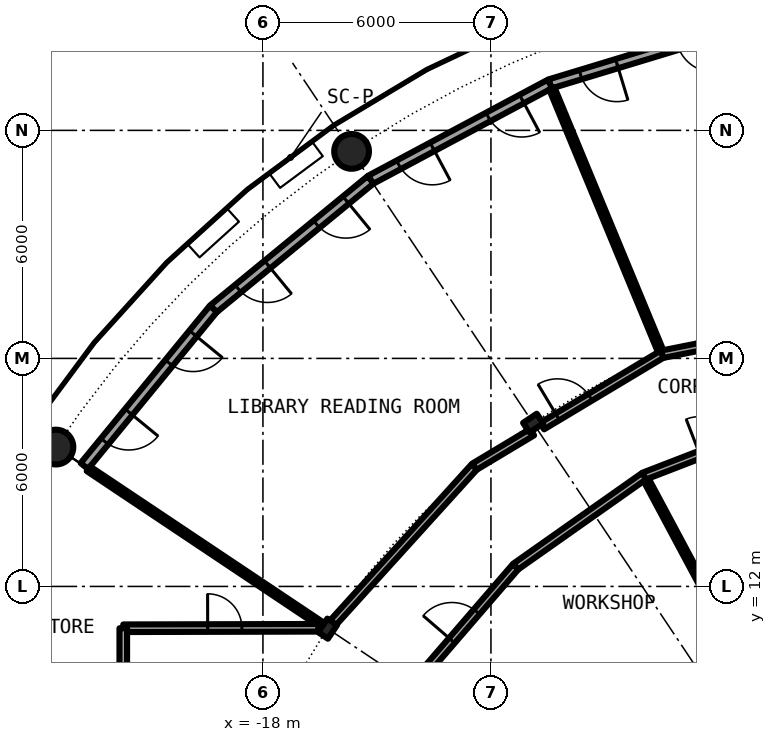
"""IFC4 building model, lengths in metres.
Left out: names, types, materials, properties, quantities, classifications, styles, units other than length and angle.
Written with IfcOpenShell. Run it as: python <this file> out.ifc"""

import sys

from ifc_helpers import new_model, si_unit, direction, frame, frame_2d, origin, origin_2d, place, context, subcontext, project, spatial, rectangle, hollow_circle, i_section, extrude, element, fill, save


model = new_model("IFC4")
c1 = context("Model", 3, precision=1e-05, world=origin(), true_north=direction((0.0, 1.0)))
c2 = subcontext(c1, "Body", "Model", "MODEL_VIEW")
j1 = project(units=[si_unit("LENGTHUNIT", "METRE"), si_unit("PLANEANGLEUNIT", "RADIAN")], contexts=[c1])
p1 = place(None, origin())
s1 = spatial("IfcSite", under=j1, at=p1, CompositionType="ELEMENT")
p2 = place(p1, origin())
s2 = spatial("IfcBuilding", under=s1, at=p2, CompositionType="ELEMENT")
p3 = place(p2, frame((0.0, 0.0, 107.45)))
s3 = spatial("IfcBuildingStorey", under=s2, at=p3, CompositionType="ELEMENT", Elevation=107.45)
for number, where, z_axis, x_axis in (
    (1, (-15.667, 23.448, 0.0), (0.0, 0.0, 1.0), (1.0, 0.0, 0.0)),
    (2, (-23.448, 15.667, 0.0), (0.0, 0.0, 1.0), (1.0, 0.0, 0.0)),
):
    element("IfcColumn", number, at=place(p3, frame(where, z_axis=z_axis, x_axis=x_axis)), inside=s3, PredefinedType="COLUMN", context=c2, shape_type="SweptSolid", body=[
        extrude(hollow_circle(Radius=0.457, WallThickness=0.04, at=origin_2d()), origin(), (0.0, 0.0, 1.0), 4.2),
    ])
for number, where, z_axis, x_axis in (
    (3, (-10.889, 16.297, 0.0), (0.0, 0.0, 1.0), (-0.556, 0.831, 0.0)),
    (4, (-16.297, 10.889, 0.0), (0.0, 0.0, 1.0), (-0.831, 0.556, 0.0)),
):
    element("IfcColumn", number, at=place(p3, frame(where, z_axis=z_axis, x_axis=x_axis)), inside=s3, PredefinedType="COLUMN", context=c2, shape_type="SweptSolid", body=[
        extrude(i_section(OverallWidth=0.307, OverallDepth=0.432, WebThickness=0.021, FlangeThickness=0.04, FilletRadius=0.027, at=origin_2d()), origin(), (0.0, 0.0, 1.0), 4.2),
    ])
p4 = place(p3, frame((-5.326, 26.775, 0.0), z_axis=(0.0, 0.0, 1.0), x_axis=(-0.956965678721, -0.290201119486, 0.0)))
e5 = element("IfcWall", 5, at=p4, inside=s3, PredefinedType="SOLIDWALL", context=c2, shape_type="SweptSolid", body=[
    extrude(rectangle(XDim=5.351, YDim=0.25, at=frame_2d((2.676, 0.0))), origin(), (0.0, 0.0, 1.0), 3.85),
])
p5 = place(p4, frame((0.841, 0.0, 0.0)))
e6 = element("IfcOpeningElement", 6, at=p5, cuts=e5, PredefinedType="OPENING", context=c2, shape_type="SweptSolid", body=[
    extrude(rectangle(XDim=1.0, YDim=2.2, at=frame_2d((0.5, 1.1))), frame((0.0, 0.135, 0.0), z_axis=(0.0, -1.0, 0.0), x_axis=(1.0, 0.0, 0.0)), (0.0, 0.0, 1.0), 0.27),
])
p6 = place(p4, frame((3.51, 0.0, 0.0)))
e7 = element("IfcOpeningElement", 7, at=p6, cuts=e5, PredefinedType="OPENING", context=c2, shape_type="SweptSolid", body=[
    extrude(rectangle(XDim=1.0, YDim=2.2, at=frame_2d((0.5, 1.1))), frame((0.0, 0.135, 0.0), z_axis=(0.0, -1.0, 0.0), x_axis=(1.0, 0.0, 0.0)), (0.0, 0.0, 1.0), 0.27),
])
p7 = place(p3, frame((-10.447, 25.222, 0.0), z_axis=(0.0, 0.0, 1.0), x_axis=(-0.881915646801, -0.471407246368, 0.0)))
e8 = element("IfcWall", 8, at=p7, inside=s3, PredefinedType="SOLIDWALL", context=c2, shape_type="SweptSolid", body=[
    extrude(rectangle(XDim=5.352, YDim=0.25, at=frame_2d((2.676, 0.0))), origin(), (0.0, 0.0, 1.0), 3.85),
])
p8 = place(p7, frame((0.841, 0.0, 0.0)))
e9 = element("IfcOpeningElement", 9, at=p8, cuts=e8, PredefinedType="OPENING", context=c2, shape_type="SweptSolid", body=[
    extrude(rectangle(XDim=1.0, YDim=2.2, at=frame_2d((0.5, 1.1))), frame((0.0, 0.135, 0.0), z_axis=(0.0, -1.0, 0.0), x_axis=(1.0, 0.0, 0.0)), (0.0, 0.0, 1.0), 0.27),
])
p9 = place(p7, frame((3.51, 0.0, 0.0)))
e10 = element("IfcOpeningElement", 10, at=p9, cuts=e8, PredefinedType="OPENING", context=c2, shape_type="SweptSolid", body=[
    extrude(rectangle(XDim=1.0, YDim=2.2, at=frame_2d((0.5, 1.1))), frame((0.0, 0.135, 0.0), z_axis=(0.0, -1.0, 0.0), x_axis=(1.0, 0.0, 0.0)), (0.0, 0.0, 1.0), 0.27),
])
p10 = place(p3, frame((-15.167, 22.699, 0.0), z_axis=(0.0, 0.0, 1.0), x_axis=(-0.773019449054, -0.634382322723, 0.0)))
e11 = element("IfcWall", 11, at=p10, inside=s3, PredefinedType="SOLIDWALL", context=c2, shape_type="SweptSolid", body=[
    extrude(rectangle(XDim=5.352, YDim=0.25, at=frame_2d((2.676, 0.0))), origin(), (0.0, 0.0, 1.0), 3.85),
])
p11 = place(p10, frame((0.841, 0.0, 0.0)))
e12 = element("IfcOpeningElement", 12, at=p11, cuts=e11, PredefinedType="OPENING", context=c2, shape_type="SweptSolid", body=[
    extrude(rectangle(XDim=1.0, YDim=2.2, at=frame_2d((0.5, 1.1))), frame((0.0, 0.135, 0.0), z_axis=(0.0, -1.0, 0.0), x_axis=(1.0, 0.0, 0.0)), (0.0, 0.0, 1.0), 0.27),
])
p12 = place(p10, frame((3.51, 0.0, 0.0)))
e13 = element("IfcOpeningElement", 13, at=p12, cuts=e11, PredefinedType="OPENING", context=c2, shape_type="SweptSolid", body=[
    extrude(rectangle(XDim=1.0, YDim=2.2, at=frame_2d((0.5, 1.1))), frame((0.0, 0.135, 0.0), z_axis=(0.0, -1.0, 0.0), x_axis=(1.0, 0.0, 0.0)), (0.0, 0.0, 1.0), 0.27),
])
p13 = place(p3, frame((-19.304, 19.304, 0.0), z_axis=(0.0, 0.0, 1.0), x_axis=(-0.634382322723, -0.773019449054, 0.0)))
e14 = element("IfcWall", 14, at=p13, inside=s3, PredefinedType="SOLIDWALL", context=c2, shape_type="SweptSolid", body=[
    extrude(rectangle(XDim=5.352, YDim=0.25, at=frame_2d((2.676, 0.0))), origin(), (0.0, 0.0, 1.0), 3.85),
])
p14 = place(p13, frame((0.841, 0.0, 0.0)))
e15 = element("IfcOpeningElement", 15, at=p14, cuts=e14, PredefinedType="OPENING", context=c2, shape_type="SweptSolid", body=[
    extrude(rectangle(XDim=1.0, YDim=2.2, at=frame_2d((0.5, 1.1))), frame((0.0, 0.135, 0.0), z_axis=(0.0, -1.0, 0.0), x_axis=(1.0, 0.0, 0.0)), (0.0, 0.0, 1.0), 0.27),
])
p15 = place(p13, frame((3.51, 0.0, 0.0)))
e16 = element("IfcOpeningElement", 16, at=p15, cuts=e14, PredefinedType="OPENING", context=c2, shape_type="SweptSolid", body=[
    extrude(rectangle(XDim=1.0, YDim=2.2, at=frame_2d((0.5, 1.1))), frame((0.0, 0.135, 0.0), z_axis=(0.0, -1.0, 0.0), x_axis=(1.0, 0.0, 0.0)), (0.0, 0.0, 1.0), 0.27),
])
p16 = place(p3, frame((-22.595, 15.098, 0.0), z_axis=(0.0, 0.0, 1.0), x_axis=(0.831406593008, -0.555664536482, 0.0)))
e17 = element("IfcWall", 17, at=p16, inside=s3, PredefinedType="PARTITIONING", context=c2, shape_type="SweptSolid", body=[
    extrude(rectangle(XDim=7.358, YDim=0.15, at=frame_2d((3.679, 0.0))), origin(), (0.0, 0.0, 1.0), 3.85),
])
p17 = place(p3, frame((-10.399, 25.106, 0.0), z_axis=(0.0, 0.0, 1.0), x_axis=(0.382600411313, -0.923913916587, 0.0)))
e18 = element("IfcWall", 18, at=p17, inside=s3, PredefinedType="PARTITIONING", context=c2, shape_type="SweptSolid", body=[
    extrude(rectangle(XDim=7.574, YDim=0.15, at=frame_2d((3.787, 0.0))), origin(), (0.0, 0.0, 1.0), 3.85),
])
p18 = place(p3, frame((-7.969, 14.903, 0.0), z_axis=(0.0, 0.0, 1.0), x_axis=(0.471428625665, -0.881904218667, 0.0)))
e19 = element("IfcWall", 19, at=p18, inside=s3, PredefinedType="PARTITIONING", context=c2, shape_type="SweptSolid", body=[
    extrude(rectangle(XDim=9.18, YDim=0.15, at=frame_2d((4.59, 0.0))), origin(), (0.0, 0.0, 1.0), 3.85),
])
p19 = place(p3, frame((-21.675, 10.9, 0.0), z_axis=(0.0, 0.0, 1.0), x_axis=(0.999997173357, 0.002377662213, 0.0)))
e20 = element("IfcWall", 20, at=p19, inside=s3, PredefinedType="PARTITIONING", context=c2, shape_type="SweptSolid", body=[
    extrude(rectangle(XDim=5.134, YDim=0.2, at=frame_2d((2.567, 0.0))), origin(), (0.0, 0.0, 1.0), 3.85),
])
p20 = place(p19, frame((2.221, 0.0, 0.0)))
e21 = element("IfcOpeningElement", 21, at=p20, cuts=e20, PredefinedType="OPENING", context=c2, shape_type="SweptSolid", body=[
    extrude(rectangle(XDim=0.9, YDim=2.3, at=frame_2d((0.45, 1.15))), frame((0.0, 0.11, 0.0), z_axis=(0.0, -1.0, 0.0), x_axis=(1.0, 0.0, 0.0)), (0.0, 0.0, 1.0), 0.22),
])
p21 = place(p3, frame((-14.052, 9.389, 0.0), z_axis=(0.0, 0.0, 1.0), x_axis=(0.653212695939, 0.757174467256, 0.0)))
e22 = element("IfcWall", 22, at=p21, inside=s3, PredefinedType="PARTITIONING", context=c2, shape_type="SweptSolid", body=[
    extrude(rectangle(XDim=4.138, YDim=0.2, at=frame_2d((2.069, 0.0))), origin(), (0.0, 0.0, 1.0), 3.85),
])
p22 = place(p21, frame((1.569, 0.0, 0.0)))
e23 = element("IfcOpeningElement", 23, at=p22, cuts=e22, PredefinedType="OPENING", context=c2, shape_type="SweptSolid", body=[
    extrude(rectangle(XDim=1.0, YDim=2.3, at=frame_2d((0.5, 1.15))), frame((0.0, 0.11, 0.0), z_axis=(0.0, -1.0, 0.0), x_axis=(1.0, 0.0, 0.0)), (0.0, 0.0, 1.0), 0.22),
])
p23 = place(p3, frame((-11.349, 12.522, 0.0), z_axis=(0.0, 0.0, 1.0), x_axis=(0.817567680547, 0.575832517079, 0.0)))
e24 = element("IfcWall", 24, at=p23, inside=s3, PredefinedType="PARTITIONING", context=c2, shape_type="SweptSolid", body=[
    extrude(rectangle(XDim=4.137, YDim=0.2, at=frame_2d((2.068, 0.0))), origin(), (0.0, 0.0, 1.0), 3.85),
])
p24 = place(p3, frame((-7.967, 14.904, 0.0), z_axis=(0.0, 0.0, 1.0), x_axis=(0.932943640288, 0.360022449363, 0.0)))
e25 = element("IfcWall", 25, at=p24, inside=s3, PredefinedType="PARTITIONING", context=c2, shape_type="SweptSolid", body=[
    extrude(rectangle(XDim=4.139, YDim=0.2, at=frame_2d((2.069, 0.0))), origin(), (0.0, 0.0, 1.0), 3.85),
])
p25 = place(p24, frame((1.569, 0.0, 0.0)))
e26 = element("IfcOpeningElement", 26, at=p25, cuts=e25, PredefinedType="OPENING", context=c2, shape_type="SweptSolid", body=[
    extrude(rectangle(XDim=1.0, YDim=2.3, at=frame_2d((0.5, 1.15))), frame((0.0, 0.11, 0.0), z_axis=(0.0, -1.0, 0.0), x_axis=(1.0, 0.0, 0.0)), (0.0, 0.0, 1.0), 0.22),
])
p26 = place(p3, frame((-7.501, 18.108, 0.0), z_axis=(0.0, 0.0, 1.0), x_axis=(0.980781515054, 0.195109250749, 0.0)))
e27 = element("IfcWall", 27, at=p26, inside=s3, PredefinedType="PARTITIONING", context=c2, shape_type="SweptSolid", body=[
    extrude(rectangle(XDim=7.648, YDim=0.2, at=frame_2d((3.824, 0.0))), origin(), (0.0, 0.0, 1.0), 3.54),
])
p27 = place(p26, frame((4.35, 0.0, 0.0)))
e28 = element("IfcOpeningElement", 28, at=p27, cuts=e27, PredefinedType="OPENING", context=c2, shape_type="SweptSolid", body=[
    extrude(rectangle(XDim=1.0, YDim=2.3, at=frame_2d((0.5, 1.15))), frame((0.0, 0.11, 0.0), z_axis=(0.0, -1.0, 0.0), x_axis=(1.0, 0.0, 0.0)), (0.0, 0.0, 1.0), 0.22),
])
p28 = place(p3, frame((-16.192, 11.004, 0.0), z_axis=(0.0, 0.0, 1.0), x_axis=(0.671481997275, 0.741020868354, 0.0)))
e29 = element("IfcWall", 29, at=p28, inside=s3, PredefinedType="PARTITIONING", context=c2, shape_type="SweptSolid", body=[
    extrude(rectangle(XDim=5.596, YDim=0.2, at=frame_2d((2.798, 0.0))), origin(), (0.0, 0.0, 1.0), 3.54),
])
p29 = place(p3, frame((-12.434, 15.151, 0.0), z_axis=(0.0, 0.0, 1.0), x_axis=(0.857663265693, 0.514211748875, 0.0)))
e30 = element("IfcWall", 30, at=p29, inside=s3, PredefinedType="PARTITIONING", context=c2, shape_type="SweptSolid", body=[
    extrude(rectangle(XDim=1.77, YDim=0.2, at=frame_2d((0.885, 0.0))), origin(), (0.0, 0.0, 1.0), 3.54),
])
p30 = place(p3, frame((-10.653, 16.219, 0.0), z_axis=(0.0, 0.0, 1.0), x_axis=(0.857774179698, 0.514026708103, 0.0)))
e31 = element("IfcWall", 31, at=p30, inside=s3, PredefinedType="PARTITIONING", context=c2, shape_type="SweptSolid", body=[
    extrude(rectangle(XDim=3.675, YDim=0.2, at=frame_2d((1.837, 0.0))), origin(), (0.0, 0.0, 1.0), 3.54),
])
p31 = place(p30, frame((0.473, 0.0, 0.0)))
e32 = element("IfcOpeningElement", 32, at=p31, cuts=e31, PredefinedType="OPENING", context=c2, shape_type="SweptSolid", body=[
    extrude(rectangle(XDim=1.0, YDim=2.3, at=frame_2d((0.5, 1.15))), frame((0.0, 0.11, 0.0), z_axis=(0.0, -1.0, 0.0), x_axis=(1.0, 0.0, 0.0)), (0.0, 0.0, 1.0), 0.22),
])
p32 = place(p3, frame((-21.675, 9.2, 0.0), z_axis=(0.0, 0.0, 1.0), x_axis=(0.0, 1.0, 0.0)))
e33 = element("IfcWall", 33, at=p32, inside=s3, PredefinedType="PARTITIONING", context=c2, shape_type="SweptSolid", body=[
    extrude(rectangle(XDim=1.7, YDim=0.2, at=frame_2d((0.85, 0.0))), origin(), (0.0, 0.0, 1.0), 3.85),
])
p33 = place(p6, origin())
e34 = element("IfcDoor", 34, at=p33, inside=s3, OperationType="SINGLE_SWING_LEFT", PredefinedType="DOOR", context=c2, shape_type="SweptSolid", body=[
    extrude(rectangle(XDim=1.0, YDim=2.2, at=frame_2d((0.5, 1.1))), frame((0.0, 0.025, 0.0), z_axis=(0.0, -1.0, 0.0), x_axis=(1.0, 0.0, 0.0)), (0.0, 0.0, 1.0), 0.05),
])
fill(e7, e34)
p34 = place(p8, origin())
e35 = element("IfcDoor", 35, at=p34, inside=s3, OperationType="SINGLE_SWING_LEFT", PredefinedType="DOOR", context=c2, shape_type="SweptSolid", body=[
    extrude(rectangle(XDim=1.0, YDim=2.2, at=frame_2d((0.5, 1.1))), frame((0.0, 0.025, 0.0), z_axis=(0.0, -1.0, 0.0), x_axis=(1.0, 0.0, 0.0)), (0.0, 0.0, 1.0), 0.05),
])
fill(e9, e35)
p35 = place(p9, origin())
e36 = element("IfcDoor", 36, at=p35, inside=s3, OperationType="SINGLE_SWING_LEFT", PredefinedType="DOOR", context=c2, shape_type="SweptSolid", body=[
    extrude(rectangle(XDim=1.0, YDim=2.2, at=frame_2d((0.5, 1.1))), frame((0.0, 0.025, 0.0), z_axis=(0.0, -1.0, 0.0), x_axis=(1.0, 0.0, 0.0)), (0.0, 0.0, 1.0), 0.05),
])
fill(e10, e36)
p36 = place(p11, origin())
e37 = element("IfcDoor", 37, at=p36, inside=s3, OperationType="SINGLE_SWING_LEFT", PredefinedType="DOOR", context=c2, shape_type="SweptSolid", body=[
    extrude(rectangle(XDim=1.0, YDim=2.2, at=frame_2d((0.5, 1.1))), frame((0.0, 0.025, 0.0), z_axis=(0.0, -1.0, 0.0), x_axis=(1.0, 0.0, 0.0)), (0.0, 0.0, 1.0), 0.05),
])
fill(e12, e37)
p37 = place(p12, origin())
e38 = element("IfcDoor", 38, at=p37, inside=s3, OperationType="SINGLE_SWING_LEFT", PredefinedType="DOOR", context=c2, shape_type="SweptSolid", body=[
    extrude(rectangle(XDim=1.0, YDim=2.2, at=frame_2d((0.5, 1.1))), frame((0.0, 0.025, 0.0), z_axis=(0.0, -1.0, 0.0), x_axis=(1.0, 0.0, 0.0)), (0.0, 0.0, 1.0), 0.05),
])
fill(e13, e38)
p38 = place(p14, origin())
e39 = element("IfcDoor", 39, at=p38, inside=s3, OperationType="SINGLE_SWING_LEFT", PredefinedType="DOOR", context=c2, shape_type="SweptSolid", body=[
    extrude(rectangle(XDim=1.0, YDim=2.2, at=frame_2d((0.5, 1.1))), frame((0.0, 0.025, 0.0), z_axis=(0.0, -1.0, 0.0), x_axis=(1.0, 0.0, 0.0)), (0.0, 0.0, 1.0), 0.05),
])
fill(e15, e39)
p39 = place(p15, origin())
e40 = element("IfcDoor", 40, at=p39, inside=s3, OperationType="SINGLE_SWING_LEFT", PredefinedType="DOOR", context=c2, shape_type="SweptSolid", body=[
    extrude(rectangle(XDim=1.0, YDim=2.2, at=frame_2d((0.5, 1.1))), frame((0.0, 0.025, 0.0), z_axis=(0.0, -1.0, 0.0), x_axis=(1.0, 0.0, 0.0)), (0.0, 0.0, 1.0), 0.05),
])
fill(e16, e40)
p40 = place(p31, origin())
e41 = element("IfcDoor", 41, at=p40, inside=s3, OperationType="SINGLE_SWING_LEFT", PredefinedType="DOOR", context=c2, shape_type="SweptSolid", body=[
    extrude(rectangle(XDim=1.0, YDim=2.3, at=frame_2d((0.5, 1.15))), frame((0.0, 0.025, 0.0), z_axis=(0.0, -1.0, 0.0), x_axis=(1.0, 0.0, 0.0)), (0.0, 0.0, 1.0), 0.05),
])
fill(e32, e41)
p41 = place(p22, origin())
e42 = element("IfcDoor", 42, at=p41, inside=s3, OperationType="SINGLE_SWING_RIGHT", PredefinedType="DOOR", context=c2, shape_type="SweptSolid", body=[
    extrude(rectangle(XDim=1.0, YDim=2.3, at=frame_2d((0.5, 1.15))), frame((0.0, 0.025, 0.0), z_axis=(0.0, -1.0, 0.0), x_axis=(1.0, 0.0, 0.0)), (0.0, 0.0, 1.0), 0.05),
])
fill(e23, e42)
p42 = place(p20, origin())
e43 = element("IfcDoor", 43, at=p42, inside=s3, OperationType="SINGLE_SWING_RIGHT", PredefinedType="DOOR", context=c2, shape_type="SweptSolid", body=[
    extrude(rectangle(XDim=0.9, YDim=2.3, at=frame_2d((0.45, 1.15))), frame((0.0, 0.025, 0.0), z_axis=(0.0, -1.0, 0.0), x_axis=(1.0, 0.0, 0.0)), (0.0, 0.0, 1.0), 0.05),
])
fill(e21, e43)
save(model, sys.argv[1])
